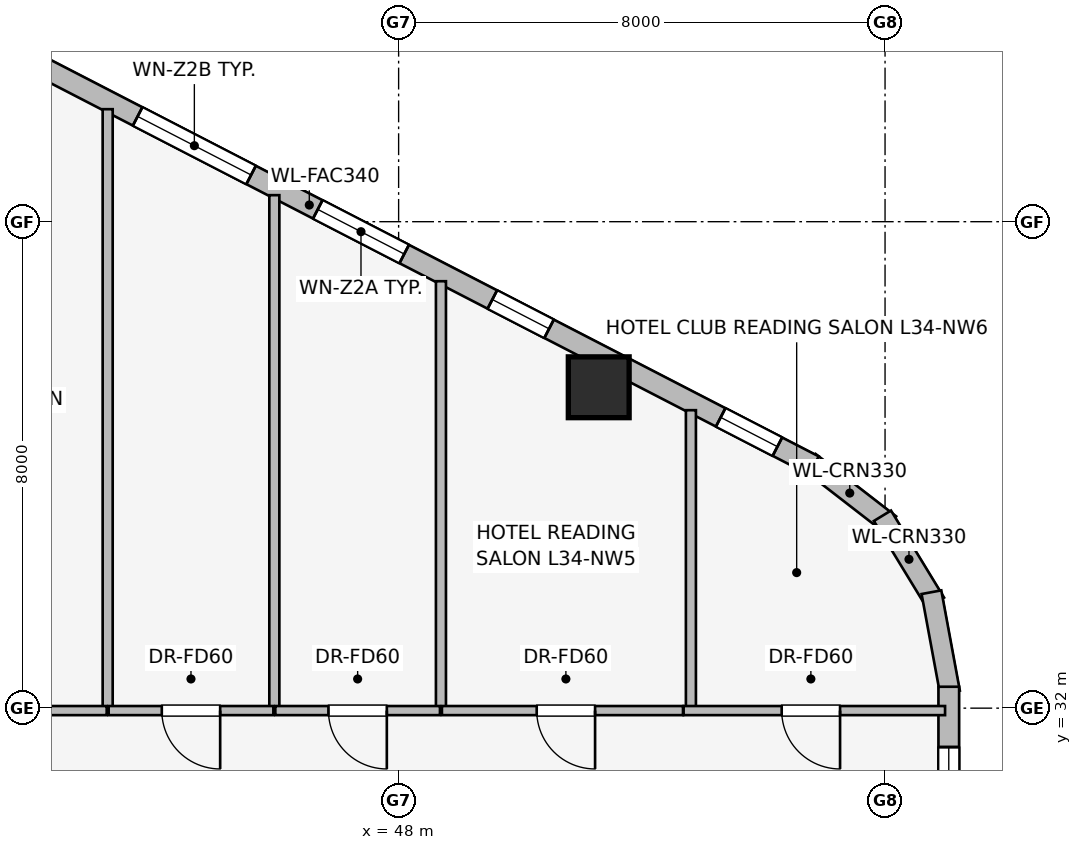
"""IFC4 building model, lengths in metres.
Left out: names, types, materials, properties, quantities, classifications, styles, units other than length and angle.
Written with IfcOpenShell. Run it as: python <this file> out.ifc"""

import sys

from ifc_helpers import new_model, si_unit, direction, frame, frame_2d, origin, origin_2d, place, context, subcontext, project, spatial, rectangle, extrude, element, fill, save


model = new_model("IFC4")
c1 = context("Model", 3, precision=1e-05, world=origin(), true_north=direction((0.0, 1.0)))
c2 = subcontext(c1, "Body", "Model", "MODEL_VIEW")
j1 = project(units=[si_unit("LENGTHUNIT", "METRE"), si_unit("PLANEANGLEUNIT", "RADIAN")], contexts=[c1])
p1 = place(None, origin())
s1 = spatial("IfcSite", under=j1, at=p1, CompositionType="ELEMENT")
p2 = place(p1, origin())
s2 = spatial("IfcBuilding", under=s1, at=p2, CompositionType="ELEMENT")
p3 = place(p2, frame((0.0, 0.0, 129.15)))
s3 = spatial("IfcBuildingStorey", under=s2, at=p3, CompositionType="ELEMENT", Elevation=129.15)
p4 = place(p3, frame((51.291, 37.277, 0.0), z_axis=(0.0, 0.0, 1.0), x_axis=(1.0, 0.0, 0.0)))
e1 = element("IfcColumn", 1, at=p4, inside=s3, PredefinedType="COLUMN", context=c2, shape_type="SweptSolid", body=[
    extrude(rectangle(XDim=1.0, YDim=1.0, at=origin_2d()), origin(), (0.0, 0.0, 1.0), 3.45),
])
p5 = place(p3, frame((54.757, 36.05, 0.0), z_axis=(0.0, 0.0, 1.0), x_axis=(0.790621329885, -0.612305408053, 0.0)))
e2 = element("IfcWall", 2, at=p5, inside=s3, PredefinedType="STANDARD", context=c2, shape_type="SweptSolid", body=[
    extrude(rectangle(XDim=1.676, YDim=0.33, at=frame_2d((0.838, 0.0))), origin(), (0.0, 0.0, 1.0), 3.19),
])
p6 = place(p3, frame((55.957, 35.164, 0.0), z_axis=(0.0, 0.0, 1.0), x_axis=(0.520519429557, -0.853849824883, 0.0)))
e3 = element("IfcWall", 3, at=p6, inside=s3, PredefinedType="STANDARD", context=c2, shape_type="SweptSolid", body=[
    extrude(rectangle(XDim=1.677, YDim=0.33, at=frame_2d((0.839, 0.0))), origin(), (0.0, 0.0, 1.0), 3.19),
])
p7 = place(p3, frame((56.763, 33.907, 0.0), z_axis=(0.0, 0.0, 1.0), x_axis=(0.181984991895, -0.983301308209, 0.0)))
e4 = element("IfcWall", 4, at=p7, inside=s3, PredefinedType="STANDARD", context=c2, shape_type="SweptSolid", body=[
    extrude(rectangle(XDim=1.677, YDim=0.33, at=frame_2d((0.838, 0.0))), origin(), (0.0, 0.0, 1.0), 3.19),
])
p8 = place(p3, frame((38.231, 44.558, 0.0), z_axis=(0.0, 0.0, 1.0), x_axis=(0.888613612362, -0.458656568606, 0.0)))
e5 = element("IfcWall", 5, at=p8, inside=s3, PredefinedType="STANDARD", context=c2, shape_type="SweptSolid", body=[
    extrude(rectangle(XDim=18.681, YDim=0.34, at=frame_2d((9.34, 0.0))), origin(), (0.0, 0.0, 1.0), 3.19),
])
p9 = place(p8, frame((1.727, 0.0, 0.75)))
e6 = element("IfcOpeningElement", 6, at=p9, cuts=e5, PredefinedType="OPENING", context=c2, shape_type="SweptSolid", body=[
    extrude(rectangle(XDim=1.05, YDim=1.4, at=frame_2d((0.525, 0.7))), frame((0.0, 0.18, 0.0), z_axis=(0.0, -1.0, 0.0), x_axis=(1.0, 0.0, 0.0)), (0.0, 0.0, 1.0), 0.36),
])
p10 = place(p8, frame((6.163, 0.0, 0.75)))
e7 = element("IfcOpeningElement", 7, at=p10, cuts=e5, PredefinedType="OPENING", context=c2, shape_type="SweptSolid", body=[
    extrude(rectangle(XDim=2.1, YDim=1.5, at=frame_2d((1.05, 0.75))), frame((0.0, 0.18, 0.0), z_axis=(0.0, -1.0, 0.0), x_axis=(1.0, 0.0, 0.0)), (0.0, 0.0, 1.0), 0.36),
])
p11 = place(p8, frame((9.497, 0.0, 0.75)))
e8 = element("IfcOpeningElement", 8, at=p11, cuts=e5, PredefinedType="OPENING", context=c2, shape_type="SweptSolid", body=[
    extrude(rectangle(XDim=1.6, YDim=1.55, at=frame_2d((0.8, 0.775))), frame((0.0, 0.18, 0.0), z_axis=(0.0, -1.0, 0.0), x_axis=(1.0, 0.0, 0.0)), (0.0, 0.0, 1.0), 0.36),
])
p12 = place(p8, frame((12.728, 0.0, 0.75)))
e9 = element("IfcOpeningElement", 9, at=p12, cuts=e5, PredefinedType="OPENING", context=c2, shape_type="SweptSolid", body=[
    extrude(rectangle(XDim=1.05, YDim=1.4, at=frame_2d((0.525, 0.7))), frame((0.0, 0.18, 0.0), z_axis=(0.0, -1.0, 0.0), x_axis=(1.0, 0.0, 0.0)), (0.0, 0.0, 1.0), 0.36),
])
p13 = place(p8, frame((16.954, 0.0, 0.75)))
e10 = element("IfcOpeningElement", 10, at=p13, cuts=e5, PredefinedType="OPENING", context=c2, shape_type="SweptSolid", body=[
    extrude(rectangle(XDim=1.05, YDim=1.4, at=frame_2d((0.525, 0.7))), frame((0.0, 0.18, 0.0), z_axis=(0.0, -1.0, 0.0), x_axis=(1.0, 0.0, 0.0)), (0.0, 0.0, 1.0), 0.36),
])
p14 = place(p3, frame((57.048, 32.352, 0.0), z_axis=(0.0, 0.0, 1.0), x_axis=(0.0, -1.0, 0.0)))
e11 = element("IfcWall", 11, at=p14, inside=s3, PredefinedType="STANDARD", context=c2, shape_type="SweptSolid", body=[
    extrude(rectangle(XDim=16.704, YDim=0.34, at=frame_2d((8.352, 0.0))), origin(), (0.0, 0.0, 1.0), 3.19),
])
p15 = place(p14, frame((0.992, 0.0, 0.75)))
e12 = element("IfcOpeningElement", 12, at=p15, cuts=e11, PredefinedType="OPENING", context=c2, shape_type="SweptSolid", body=[
    extrude(rectangle(XDim=1.05, YDim=1.4, at=frame_2d((0.525, 0.7))), frame((0.0, 0.18, 0.0), z_axis=(0.0, -1.0, 0.0), x_axis=(1.0, 0.0, 0.0)), (0.0, 0.0, 1.0), 0.36),
])
p16 = place(p14, frame((4.935, 0.0, 0.75)))
e13 = element("IfcOpeningElement", 13, at=p16, cuts=e11, PredefinedType="OPENING", context=c2, shape_type="SweptSolid", body=[
    extrude(rectangle(XDim=2.1, YDim=1.5, at=frame_2d((1.05, 0.75))), frame((0.0, 0.18, 0.0), z_axis=(0.0, -1.0, 0.0), x_axis=(1.0, 0.0, 0.0)), (0.0, 0.0, 1.0), 0.36),
])
p17 = place(p14, frame((9.919, 0.0, 0.75)))
e14 = element("IfcOpeningElement", 14, at=p17, cuts=e11, PredefinedType="OPENING", context=c2, shape_type="SweptSolid", body=[
    extrude(rectangle(XDim=1.6, YDim=1.55, at=frame_2d((0.8, 0.775))), frame((0.0, 0.18, 0.0), z_axis=(0.0, -1.0, 0.0), x_axis=(1.0, 0.0, 0.0)), (0.0, 0.0, 1.0), 0.36),
])
p18 = place(p14, frame((14.702, 0.0, 0.75)))
e15 = element("IfcOpeningElement", 15, at=p18, cuts=e11, PredefinedType="OPENING", context=c2, shape_type="SweptSolid", body=[
    extrude(rectangle(XDim=1.05, YDim=1.4, at=frame_2d((0.525, 0.7))), frame((0.0, 0.18, 0.0), z_axis=(0.0, -1.0, 0.0), x_axis=(1.0, 0.0, 0.0)), (0.0, 0.0, 1.0), 0.36),
])
p19 = place(p3, frame((43.215, 31.97, 0.0), z_axis=(0.0, 0.0, 1.0), x_axis=(0.0, 1.0, 0.0)))
e16 = element("IfcWall", 16, at=p19, inside=s3, PredefinedType="PARTITIONING", context=c2, shape_type="SweptSolid", body=[
    extrude(rectangle(XDim=9.88, YDim=0.165, at=frame_2d((4.94, 0.0))), origin(), (0.0, 0.0, 1.0), 3.19),
])
p20 = place(p3, frame((45.956, 31.97, 0.0), z_axis=(0.0, 0.0, 1.0), x_axis=(0.0, 1.0, 0.0)))
e17 = element("IfcWall", 17, at=p20, inside=s3, PredefinedType="PARTITIONING", context=c2, shape_type="SweptSolid", body=[
    extrude(rectangle(XDim=8.466, YDim=0.165, at=frame_2d((4.233, 0.0))), origin(), (0.0, 0.0, 1.0), 3.19),
])
p21 = place(p3, frame((48.696, 31.97, 0.0), z_axis=(0.0, 0.0, 1.0), x_axis=(0.0, 1.0, 0.0)))
e18 = element("IfcWall", 18, at=p21, inside=s3, PredefinedType="PARTITIONING", context=c2, shape_type="SweptSolid", body=[
    extrude(rectangle(XDim=7.051, YDim=0.165, at=frame_2d((3.525, 0.0))), origin(), (0.0, 0.0, 1.0), 3.19),
])
p22 = place(p3, frame((52.807, 31.97, 0.0), z_axis=(0.0, 0.0, 1.0), x_axis=(0.0, 1.0, 0.0)))
e19 = element("IfcWall", 19, at=p22, inside=s3, PredefinedType="PARTITIONING", context=c2, shape_type="SweptSolid", body=[
    extrude(rectangle(XDim=4.93, YDim=0.165, at=frame_2d((2.465, 0.0))), origin(), (0.0, 0.0, 1.0), 3.19),
])
p23 = place(p3, frame((43.199, 31.96, 0.0), z_axis=(0.0, 0.0, 1.0), x_axis=(-1.0, 0.0, 0.0)))
e20 = element("IfcWall", 20, at=p23, inside=s3, PredefinedType="PARTITIONING", context=c2, shape_type="SweptSolid", body=[
    extrude(rectangle(XDim=3.965, YDim=0.15, at=frame_2d((1.982, 0.0))), origin(), (0.0, 0.0, 1.0), 3.19),
])
p24 = place(p23, frame((1.56, 0.0, 0.0)))
e21 = element("IfcOpeningElement", 21, at=p24, cuts=e20, PredefinedType="OPENING", context=c2, shape_type="SweptSolid", body=[
    extrude(rectangle(XDim=0.96, YDim=2.0, at=frame_2d((0.48, 1.0))), frame((0.0, 0.085, 0.0), z_axis=(0.0, -1.0, 0.0), x_axis=(1.0, 0.0, 0.0)), (0.0, 0.0, 1.0), 0.17),
])
p25 = place(p3, frame((45.94, 31.96, 0.0), z_axis=(0.0, 0.0, 1.0), x_axis=(-1.0, 0.0, 0.0)))
e22 = element("IfcWall", 22, at=p25, inside=s3, PredefinedType="PARTITIONING", context=c2, shape_type="SweptSolid", body=[
    extrude(rectangle(XDim=2.709, YDim=0.15, at=frame_2d((1.354, 0.0))), origin(), (0.0, 0.0, 1.0), 3.19),
])
p26 = place(p25, frame((0.875, 0.0, 0.0)))
e23 = element("IfcOpeningElement", 23, at=p26, cuts=e22, PredefinedType="OPENING", context=c2, shape_type="SweptSolid", body=[
    extrude(rectangle(XDim=0.96, YDim=2.0, at=frame_2d((0.48, 1.0))), frame((0.0, 0.085, 0.0), z_axis=(0.0, -1.0, 0.0), x_axis=(1.0, 0.0, 0.0)), (0.0, 0.0, 1.0), 0.17),
])
p27 = place(p3, frame((48.68, 31.96, 0.0), z_axis=(0.0, 0.0, 1.0), x_axis=(-1.0, 0.0, 0.0)))
e24 = element("IfcWall", 24, at=p27, inside=s3, PredefinedType="PARTITIONING", context=c2, shape_type="SweptSolid", body=[
    extrude(rectangle(XDim=2.708, YDim=0.15, at=frame_2d((1.354, 0.0))), origin(), (0.0, 0.0, 1.0), 3.19),
])
p28 = place(p27, frame((0.874, 0.0, 0.0)))
e25 = element("IfcOpeningElement", 25, at=p28, cuts=e24, PredefinedType="OPENING", context=c2, shape_type="SweptSolid", body=[
    extrude(rectangle(XDim=0.96, YDim=2.0, at=frame_2d((0.48, 1.0))), frame((0.0, 0.085, 0.0), z_axis=(0.0, -1.0, 0.0), x_axis=(1.0, 0.0, 0.0)), (0.0, 0.0, 1.0), 0.17),
])
p29 = place(p3, frame((52.677, 31.96, 0.0), z_axis=(0.0, 0.0, 1.0), x_axis=(-1.0, 0.0, 0.0)))
e26 = element("IfcWall", 26, at=p29, inside=s3, PredefinedType="PARTITIONING", context=c2, shape_type="SweptSolid", body=[
    extrude(rectangle(XDim=3.965, YDim=0.15, at=frame_2d((1.982, 0.0))), origin(), (0.0, 0.0, 1.0), 3.19),
])
p30 = place(p29, frame((1.446, 0.0, 0.0)))
e27 = element("IfcOpeningElement", 27, at=p30, cuts=e26, PredefinedType="OPENING", context=c2, shape_type="SweptSolid", body=[
    extrude(rectangle(XDim=0.96, YDim=2.0, at=frame_2d((0.48, 1.0))), frame((0.0, 0.085, 0.0), z_axis=(0.0, -1.0, 0.0), x_axis=(1.0, 0.0, 0.0)), (0.0, 0.0, 1.0), 0.17),
])
p31 = place(p3, frame((56.987, 31.96, 0.0), z_axis=(0.0, 0.0, 1.0), x_axis=(-1.0, 0.0, 0.0)))
e28 = element("IfcWall", 28, at=p31, inside=s3, PredefinedType="PARTITIONING", context=c2, shape_type="SweptSolid", body=[
    extrude(rectangle(XDim=4.3, YDim=0.15, at=frame_2d((2.15, 0.0))), origin(), (0.0, 0.0, 1.0), 3.19),
])
p32 = place(p31, frame((1.727, 0.0, 0.0)))
e29 = element("IfcOpeningElement", 29, at=p32, cuts=e28, PredefinedType="OPENING", context=c2, shape_type="SweptSolid", body=[
    extrude(rectangle(XDim=0.96, YDim=2.0, at=frame_2d((0.48, 1.0))), frame((0.0, 0.085, 0.0), z_axis=(0.0, -1.0, 0.0), x_axis=(1.0, 0.0, 0.0)), (0.0, 0.0, 1.0), 0.17),
])
p33 = place(p10, origin())
e30 = element("IfcWindow", 30, at=p33, inside=s3, PartitioningType="SINGLE_PANEL", PredefinedType="WINDOW", context=c2, shape_type="SweptSolid", body=[
    extrude(rectangle(XDim=2.1, YDim=1.5, at=frame_2d((1.05, 0.75))), frame((0.0, 0.03, 0.0), z_axis=(0.0, -1.0, 0.0), x_axis=(1.0, 0.0, 0.0)), (0.0, 0.0, 1.0), 0.06),
])
fill(e7, e30)
p34 = place(p11, origin())
e31 = element("IfcWindow", 31, at=p34, inside=s3, PartitioningType="SINGLE_PANEL", PredefinedType="WINDOW", context=c2, shape_type="SweptSolid", body=[
    extrude(rectangle(XDim=1.6, YDim=1.55, at=frame_2d((0.8, 0.775))), frame((0.0, 0.03, 0.0), z_axis=(0.0, -1.0, 0.0), x_axis=(1.0, 0.0, 0.0)), (0.0, 0.0, 1.0), 0.06),
])
fill(e8, e31)
p35 = place(p12, origin())
e32 = element("IfcWindow", 32, at=p35, inside=s3, PartitioningType="SINGLE_PANEL", PredefinedType="WINDOW", context=c2, shape_type="SweptSolid", body=[
    extrude(rectangle(XDim=1.05, YDim=1.4, at=frame_2d((0.525, 0.7))), frame((0.0, 0.03, 0.0), z_axis=(0.0, -1.0, 0.0), x_axis=(1.0, 0.0, 0.0)), (0.0, 0.0, 1.0), 0.06),
])
fill(e9, e32)
p36 = place(p13, origin())
e33 = element("IfcWindow", 33, at=p36, inside=s3, PartitioningType="SINGLE_PANEL", PredefinedType="WINDOW", context=c2, shape_type="SweptSolid", body=[
    extrude(rectangle(XDim=1.05, YDim=1.4, at=frame_2d((0.525, 0.7))), frame((0.0, 0.03, 0.0), z_axis=(0.0, -1.0, 0.0), x_axis=(1.0, 0.0, 0.0)), (0.0, 0.0, 1.0), 0.06),
])
fill(e10, e33)
p37 = place(p15, origin())
e34 = element("IfcWindow", 34, at=p37, inside=s3, PartitioningType="SINGLE_PANEL", PredefinedType="WINDOW", context=c2, shape_type="SweptSolid", body=[
    extrude(rectangle(XDim=1.05, YDim=1.4, at=frame_2d((0.525, 0.7))), frame((0.0, 0.03, 0.0), z_axis=(0.0, -1.0, 0.0), x_axis=(1.0, 0.0, 0.0)), (0.0, 0.0, 1.0), 0.06),
])
fill(e12, e34)
p38 = place(p26, origin())
e35 = element("IfcDoor", 35, at=p38, inside=s3, OperationType="SINGLE_SWING_LEFT", PredefinedType="DOOR", context=c2, shape_type="SweptSolid", body=[
    extrude(rectangle(XDim=0.96, YDim=2.0, at=frame_2d((0.48, 1.0))), frame((0.0, 0.025, 0.0), z_axis=(0.0, -1.0, 0.0), x_axis=(1.0, 0.0, 0.0)), (0.0, 0.0, 1.0), 0.05),
])
fill(e23, e35)
p39 = place(p28, origin())
e36 = element("IfcDoor", 36, at=p39, inside=s3, OperationType="SINGLE_SWING_LEFT", PredefinedType="DOOR", context=c2, shape_type="SweptSolid", body=[
    extrude(rectangle(XDim=0.96, YDim=2.0, at=frame_2d((0.48, 1.0))), frame((0.0, 0.025, 0.0), z_axis=(0.0, -1.0, 0.0), x_axis=(1.0, 0.0, 0.0)), (0.0, 0.0, 1.0), 0.05),
])
fill(e25, e36)
p40 = place(p30, origin())
e37 = element("IfcDoor", 37, at=p40, inside=s3, OperationType="SINGLE_SWING_LEFT", PredefinedType="DOOR", context=c2, shape_type="SweptSolid", body=[
    extrude(rectangle(XDim=0.96, YDim=2.0, at=frame_2d((0.48, 1.0))), frame((0.0, 0.025, 0.0), z_axis=(0.0, -1.0, 0.0), x_axis=(1.0, 0.0, 0.0)), (0.0, 0.0, 1.0), 0.05),
])
fill(e27, e37)
p41 = place(p32, origin())
e38 = element("IfcDoor", 38, at=p41, inside=s3, OperationType="SINGLE_SWING_LEFT", PredefinedType="DOOR", context=c2, shape_type="SweptSolid", body=[
    extrude(rectangle(XDim=0.96, YDim=2.0, at=frame_2d((0.48, 1.0))), frame((0.0, 0.025, 0.0), z_axis=(0.0, -1.0, 0.0), x_axis=(1.0, 0.0, 0.0)), (0.0, 0.0, 1.0), 0.05),
])
fill(e29, e38)
save(model, sys.argv[1])
